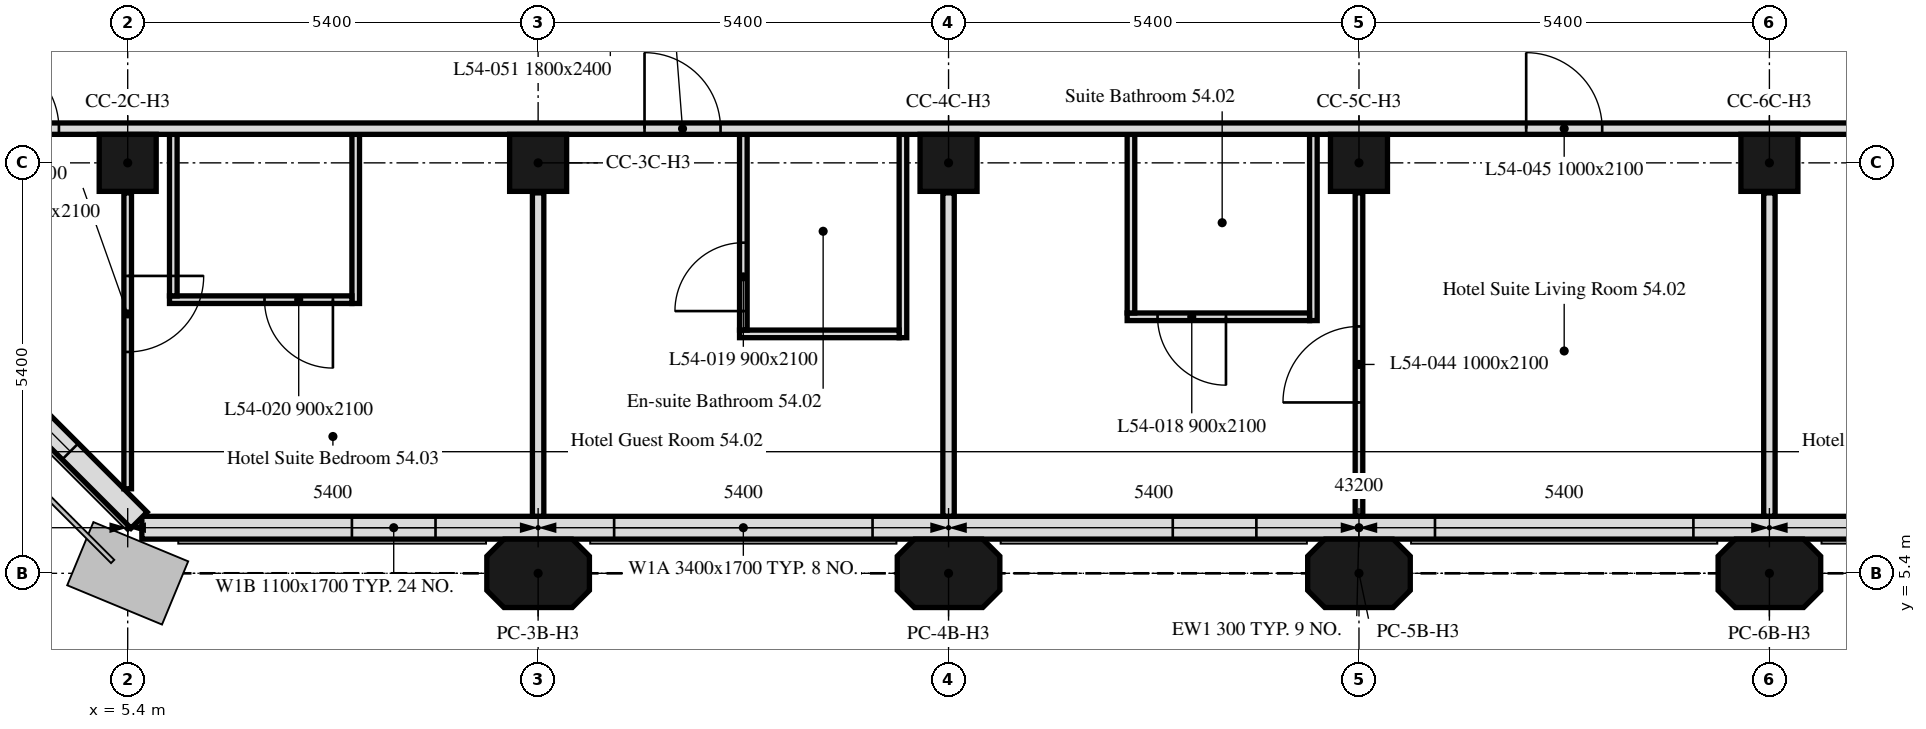
"""IFC4 building model, lengths in metres.
Left out: names, types, materials, properties, quantities, classifications, styles, units other than length and angle.
Written with IfcOpenShell. Run it as: python <this file> out.ifc"""

import sys

from ifc_helpers import new_model, si_unit, direction, frame, frame_2d, origin, origin_2d, place, context, subcontext, project, spatial, polyline, rectangle, outline, extrude, element, fill, save


model = new_model("IFC4")
c1 = context("Model", 3, precision=1e-05, world=origin(), true_north=direction((0.0, 1.0)))
c2 = subcontext(c1, "Body", "Model", "MODEL_VIEW")
j1 = project(units=[si_unit("LENGTHUNIT", "METRE"), si_unit("PLANEANGLEUNIT", "RADIAN")], contexts=[c1])
p1 = place(None, origin())
s1 = spatial("IfcSite", under=j1, at=p1, CompositionType="ELEMENT")
p2 = place(p1, origin())
s2 = spatial("IfcBuilding", under=s1, at=p2, CompositionType="ELEMENT")
p3 = place(p2, frame((0.0, 0.0, 217.0)))
s3 = spatial("IfcBuildingStorey", under=s2, at=p3, CompositionType="ELEMENT", Elevation=217.0)
for number, where, z_axis, x_axis in (
    (1, (10.8, 5.4, 0.0), (0.0, 0.0, 1.0), (1.0, 0.0, 0.0)),
    (2, (16.2, 5.4, 0.0), (0.0, 0.0, 1.0), (1.0, 0.0, 0.0)),
    (3, (21.6, 5.4, 0.0), (0.0, 0.0, 1.0), (1.0, 0.0, 0.0)),
    (4, (27.0, 5.4, 0.0), (0.0, 0.0, 1.0), (1.0, 0.0, 0.0)),
):
    element("IfcColumn", number, at=place(p3, frame(where, z_axis=z_axis, x_axis=x_axis)), inside=s3, PredefinedType="COLUMN", context=c2, shape_type="SweptSolid", body=[
        extrude(outline(polyline([(-0.45, -0.45), (0.45, -0.45), (0.675, -0.225), (0.675, 0.225), (0.45, 0.45), (-0.45, 0.45), (-0.675, 0.225), (-0.675, -0.225), (-0.45, -0.45)])), origin(), (0.0, 0.0, 1.0), 3.0),
    ])
for number, where, z_axis, x_axis in (
    (5, (5.4, 10.8, 0.0), (0.0, 0.0, 1.0), (1.0, 0.0, 0.0)),
    (6, (10.8, 10.8, 0.0), (0.0, 0.0, 1.0), (1.0, 0.0, 0.0)),
    (7, (16.2, 10.8, 0.0), (0.0, 0.0, 1.0), (1.0, 0.0, 0.0)),
    (8, (21.6, 10.8, 0.0), (0.0, 0.0, 1.0), (1.0, 0.0, 0.0)),
    (9, (27.0, 10.8, 0.0), (0.0, 0.0, 1.0), (1.0, 0.0, 0.0)),
):
    element("IfcColumn", number, at=place(p3, frame(where, z_axis=z_axis, x_axis=x_axis)), inside=s3, PredefinedType="COLUMN", context=c2, shape_type="SweptSolid", body=[
        extrude(rectangle(XDim=0.75, YDim=0.75, at=origin_2d()), origin(), (0.0, 0.0, 1.0), 3.0),
    ])
p4 = place(p3, frame((5.586, 6.0, 0.0), z_axis=(0.0, 0.0, 1.0), x_axis=(1.0, 0.0, 0.0)))
e10 = element("IfcWall", 10, at=p4, inside=s3, PredefinedType="SOLIDWALL", context=c2, shape_type="SweptSolid", body=[
    extrude(rectangle(XDim=32.027, YDim=0.3, at=frame_2d((16.014, 0.0))), origin(), (0.0, 0.0, 1.0), 3.0),
])
p5 = place(p4, frame((2.764, 0.0, 0.9)))
e11 = element("IfcOpeningElement", 11, at=p5, cuts=e10, PredefinedType="OPENING", context=c2, shape_type="SweptSolid", body=[
    extrude(rectangle(XDim=1.1, YDim=1.7, at=frame_2d((0.55, 0.85))), frame((0.0, 0.16, 0.0), z_axis=(0.0, -1.0, 0.0), x_axis=(1.0, 0.0, 0.0)), (0.0, 0.0, 1.0), 0.32),
])
p6 = place(p4, frame((6.214, 0.0, 0.9)))
e12 = element("IfcOpeningElement", 12, at=p6, cuts=e10, PredefinedType="OPENING", context=c2, shape_type="SweptSolid", body=[
    extrude(rectangle(XDim=3.4, YDim=1.7, at=frame_2d((1.7, 0.85))), frame((0.0, 0.16, 0.0), z_axis=(0.0, -1.0, 0.0), x_axis=(1.0, 0.0, 0.0)), (0.0, 0.0, 1.0), 0.32),
])
p7 = place(p4, frame((13.564, 0.0, 0.9)))
e13 = element("IfcOpeningElement", 13, at=p7, cuts=e10, PredefinedType="OPENING", context=c2, shape_type="SweptSolid", body=[
    extrude(rectangle(XDim=1.1, YDim=1.7, at=frame_2d((0.55, 0.85))), frame((0.0, 0.16, 0.0), z_axis=(0.0, -1.0, 0.0), x_axis=(1.0, 0.0, 0.0)), (0.0, 0.0, 1.0), 0.32),
])
p8 = place(p4, frame((17.014, 0.0, 0.9)))
e14 = element("IfcOpeningElement", 14, at=p8, cuts=e10, PredefinedType="OPENING", context=c2, shape_type="SweptSolid", body=[
    extrude(rectangle(XDim=3.4, YDim=1.7, at=frame_2d((1.7, 0.85))), frame((0.0, 0.16, 0.0), z_axis=(0.0, -1.0, 0.0), x_axis=(1.0, 0.0, 0.0)), (0.0, 0.0, 1.0), 0.32),
])
p9 = place(p4, frame((24.364, 0.0, 0.9)))
e15 = element("IfcOpeningElement", 15, at=p9, cuts=e10, PredefinedType="OPENING", context=c2, shape_type="SweptSolid", body=[
    extrude(rectangle(XDim=1.1, YDim=1.7, at=frame_2d((0.55, 0.85))), frame((0.0, 0.16, 0.0), z_axis=(0.0, -1.0, 0.0), x_axis=(1.0, 0.0, 0.0)), (0.0, 0.0, 1.0), 0.32),
])
p10 = place(p4, frame((27.814, 0.0, 0.9)))
e16 = element("IfcOpeningElement", 16, at=p10, cuts=e10, PredefinedType="OPENING", context=c2, shape_type="SweptSolid", body=[
    extrude(rectangle(XDim=3.4, YDim=1.7, at=frame_2d((1.7, 0.85))), frame((0.0, 0.16, 0.0), z_axis=(0.0, -1.0, 0.0), x_axis=(1.0, 0.0, 0.0)), (0.0, 0.0, 1.0), 0.32),
])
p11 = place(p3, frame((0.699, 10.949, 0.0), z_axis=(0.0, 0.0, 1.0), x_axis=(0.707106781187, -0.707106781187, 0.0)))
e17 = element("IfcWall", 17, at=p11, inside=s3, PredefinedType="SOLIDWALL", context=c2, shape_type="SweptSolid", body=[
    extrude(rectangle(XDim=6.86, YDim=0.3, at=frame_2d((3.43, 0.0))), origin(), (0.0, 0.0, 1.0), 3.0),
])
p12 = place(p11, frame((1.28, 0.0, 0.9)))
e18 = element("IfcOpeningElement", 18, at=p12, cuts=e17, PredefinedType="OPENING", context=c2, shape_type="SweptSolid", body=[
    extrude(rectangle(XDim=1.1, YDim=1.7, at=frame_2d((0.55, 0.85))), frame((0.0, 0.16, 0.0), z_axis=(0.0, -1.0, 0.0), x_axis=(1.0, 0.0, 0.0)), (0.0, 0.0, 1.0), 0.32),
])
p13 = place(p11, frame((4.48, 0.0, 0.9)))
e19 = element("IfcOpeningElement", 19, at=p13, cuts=e17, PredefinedType="OPENING", context=c2, shape_type="SweptSolid", body=[
    extrude(rectangle(XDim=1.1, YDim=1.7, at=frame_2d((0.55, 0.85))), frame((0.0, 0.16, 0.0), z_axis=(0.0, -1.0, 0.0), x_axis=(1.0, 0.0, 0.0)), (0.0, 0.0, 1.0), 0.32),
])
p14 = place(p3, frame((27.0, 10.405, 0.0), z_axis=(0.0, 0.0, 1.0), x_axis=(0.0, -1.0, 0.0)))
e20 = element("IfcWall", 20, at=p14, inside=s3, PredefinedType="PARTITIONING", context=c2, shape_type="SweptSolid", body=[
    extrude(rectangle(XDim=4.254, YDim=0.15, at=frame_2d((2.127, 0.0))), origin(), (0.0, 0.0, 1.0), 3.0),
])
p15 = place(p3, frame((21.6, 6.151, 0.0), z_axis=(0.0, 0.0, 1.0), x_axis=(0.0, 1.0, 0.0)))
e21 = element("IfcWall", 21, at=p15, inside=s3, PredefinedType="PARTITIONING", context=c2, shape_type="SweptSolid", body=[
    extrude(rectangle(XDim=4.254, YDim=0.1, at=frame_2d((2.127, 0.0))), origin(), (0.0, 0.0, 1.0), 3.0),
])
p16 = place(p15, frame((1.497, 0.0, 0.0)))
e22 = element("IfcOpeningElement", 22, at=p16, cuts=e21, PredefinedType="OPENING", context=c2, shape_type="SweptSolid", body=[
    extrude(rectangle(XDim=1.0, YDim=2.1, at=frame_2d((0.5, 1.05))), frame((0.0, 0.05, 0.0), z_axis=(0.0, -1.0, 0.0), x_axis=(1.0, 0.0, 0.0)), (0.0, 0.0, 1.0), 0.1),
])
p17 = place(p3, frame((21.0, 11.175, 0.0), z_axis=(0.0, 0.0, 1.0), x_axis=(0.0, -1.0, 0.0)))
e23 = element("IfcWall", 23, at=p17, inside=s3, PredefinedType="PARTITIONING", context=c2, shape_type="SweptSolid", body=[
    extrude(rectangle(XDim=2.45, YDim=0.1, at=frame_2d((1.225, 0.0))), origin(), (0.0, 0.0, 1.0), 3.0),
])
p18 = place(p3, frame((20.95, 8.775, 0.0), z_axis=(0.0, 0.0, 1.0), x_axis=(-1.0, 0.0, 0.0)))
e24 = element("IfcWall", 24, at=p18, inside=s3, PredefinedType="PARTITIONING", context=c2, shape_type="SweptSolid", body=[
    extrude(rectangle(XDim=2.4, YDim=0.1, at=frame_2d((1.2, 0.0))), origin(), (0.0, 0.0, 1.0), 3.0),
])
p19 = place(p18, frame((1.1, 0.0, 0.0)))
e25 = element("IfcOpeningElement", 25, at=p19, cuts=e24, PredefinedType="OPENING", context=c2, shape_type="SweptSolid", body=[
    extrude(rectangle(XDim=0.9, YDim=2.1, at=frame_2d((0.45, 1.05))), frame((0.0, 0.05, 0.0), z_axis=(0.0, -1.0, 0.0), x_axis=(1.0, 0.0, 0.0)), (0.0, 0.0, 1.0), 0.1),
])
p20 = place(p3, frame((18.6, 8.825, 0.0), z_axis=(0.0, 0.0, 1.0), x_axis=(0.0, 1.0, 0.0)))
e26 = element("IfcWall", 26, at=p20, inside=s3, PredefinedType="PARTITIONING", context=c2, shape_type="SweptSolid", body=[
    extrude(rectangle(XDim=2.35, YDim=0.1, at=frame_2d((1.175, 0.0))), origin(), (0.0, 0.0, 1.0), 3.0),
])
p21 = place(p3, frame((16.2, 10.405, 0.0), z_axis=(0.0, 0.0, 1.0), x_axis=(0.0, -1.0, 0.0)))
e27 = element("IfcWall", 27, at=p21, inside=s3, PredefinedType="PARTITIONING", context=c2, shape_type="SweptSolid", body=[
    extrude(rectangle(XDim=4.254, YDim=0.15, at=frame_2d((2.127, 0.0))), origin(), (0.0, 0.0, 1.0), 3.0),
])
p22 = place(p3, frame((15.6, 11.175, 0.0), z_axis=(0.0, 0.0, 1.0), x_axis=(0.0, -1.0, 0.0)))
e28 = element("IfcWall", 28, at=p22, inside=s3, PredefinedType="PARTITIONING", context=c2, shape_type="SweptSolid", body=[
    extrude(rectangle(XDim=2.675, YDim=0.1, at=frame_2d((1.337, 0.0))), origin(), (0.0, 0.0, 1.0), 3.0),
])
p23 = place(p3, frame((15.55, 8.55, 0.0), z_axis=(0.0, 0.0, 1.0), x_axis=(-1.0, 0.0, 0.0)))
e29 = element("IfcWall", 29, at=p23, inside=s3, PredefinedType="PARTITIONING", context=c2, shape_type="SweptSolid", body=[
    extrude(rectangle(XDim=2.1, YDim=0.1, at=frame_2d((1.05, 0.0))), origin(), (0.0, 0.0, 1.0), 3.0),
])
p24 = place(p3, frame((13.5, 8.6, 0.0), z_axis=(0.0, 0.0, 1.0), x_axis=(0.0, 1.0, 0.0)))
e30 = element("IfcWall", 30, at=p24, inside=s3, PredefinedType="PARTITIONING", context=c2, shape_type="SweptSolid", body=[
    extrude(rectangle(XDim=2.575, YDim=0.1, at=frame_2d((1.288, 0.0))), origin(), (0.0, 0.0, 1.0), 3.0),
])
p25 = place(p24, frame((0.25, 0.0, 0.0)))
e31 = element("IfcOpeningElement", 31, at=p25, cuts=e30, PredefinedType="OPENING", context=c2, shape_type="SweptSolid", body=[
    extrude(rectangle(XDim=0.9, YDim=2.1, at=frame_2d((0.45, 1.05))), frame((0.0, 0.05, 0.0), z_axis=(0.0, -1.0, 0.0), x_axis=(1.0, 0.0, 0.0)), (0.0, 0.0, 1.0), 0.1),
])
p26 = place(p3, frame((10.8, 10.405, 0.0), z_axis=(0.0, 0.0, 1.0), x_axis=(0.0, -1.0, 0.0)))
e32 = element("IfcWall", 32, at=p26, inside=s3, PredefinedType="PARTITIONING", context=c2, shape_type="SweptSolid", body=[
    extrude(rectangle(XDim=4.254, YDim=0.15, at=frame_2d((2.127, 0.0))), origin(), (0.0, 0.0, 1.0), 3.0),
])
p27 = place(p3, frame((8.4, 11.175, 0.0), z_axis=(0.0, 0.0, 1.0), x_axis=(0.0, -1.0, 0.0)))
e33 = element("IfcWall", 33, at=p27, inside=s3, PredefinedType="PARTITIONING", context=c2, shape_type="SweptSolid", body=[
    extrude(rectangle(XDim=2.225, YDim=0.1, at=frame_2d((1.113, 0.0))), origin(), (0.0, 0.0, 1.0), 3.0),
])
p28 = place(p3, frame((8.35, 9.0, 0.0), z_axis=(0.0, 0.0, 1.0), x_axis=(-1.0, 0.0, 0.0)))
e34 = element("IfcWall", 34, at=p28, inside=s3, PredefinedType="PARTITIONING", context=c2, shape_type="SweptSolid", body=[
    extrude(rectangle(XDim=2.4, YDim=0.1, at=frame_2d((1.2, 0.0))), origin(), (0.0, 0.0, 1.0), 3.0),
])
p29 = place(p28, frame((0.25, 0.0, 0.0)))
e35 = element("IfcOpeningElement", 35, at=p29, cuts=e34, PredefinedType="OPENING", context=c2, shape_type="SweptSolid", body=[
    extrude(rectangle(XDim=0.9, YDim=2.1, at=frame_2d((0.45, 1.05))), frame((0.0, 0.05, 0.0), z_axis=(0.0, -1.0, 0.0), x_axis=(1.0, 0.0, 0.0)), (0.0, 0.0, 1.0), 0.1),
])
p30 = place(p3, frame((6.0, 9.05, 0.0), z_axis=(0.0, 0.0, 1.0), x_axis=(0.0, 1.0, 0.0)))
e36 = element("IfcWall", 36, at=p30, inside=s3, PredefinedType="PARTITIONING", context=c2, shape_type="SweptSolid", body=[
    extrude(rectangle(XDim=2.125, YDim=0.1, at=frame_2d((1.062, 0.0))), origin(), (0.0, 0.0, 1.0), 3.0),
])
p31 = place(p3, frame((5.4, 10.405, 0.0), z_axis=(0.0, 0.0, 1.0), x_axis=(0.0, -1.0, 0.0)))
e37 = element("IfcWall", 37, at=p31, inside=s3, PredefinedType="PARTITIONING", context=c2, shape_type="SweptSolid", body=[
    extrude(rectangle(XDim=3.893, YDim=0.1, at=frame_2d((1.946, 0.0))), origin(), (0.0, 0.0, 1.0), 3.0),
])
p32 = place(p31, frame((1.093, 0.0, 0.0)))
e38 = element("IfcOpeningElement", 38, at=p32, cuts=e37, PredefinedType="OPENING", context=c2, shape_type="SweptSolid", body=[
    extrude(rectangle(XDim=1.0, YDim=2.1, at=frame_2d((0.5, 1.05))), frame((0.0, 0.05, 0.0), z_axis=(0.0, -1.0, 0.0), x_axis=(1.0, 0.0, 0.0)), (0.0, 0.0, 1.0), 0.1),
])
p33 = place(p3, frame((0.751, 11.25, 0.0), z_axis=(0.0, 0.0, 1.0), x_axis=(1.0, 0.0, 0.0)))
e39 = element("IfcWall", 39, at=p33, inside=s3, PredefinedType="PARTITIONING", context=c2, shape_type="SweptSolid", body=[
    extrude(rectangle(XDim=41.698, YDim=0.15, at=frame_2d((20.849, 0.0))), origin(), (0.0, 0.0, 1.0), 3.0),
])
p34 = place(p33, frame((39.249, 0.0, 0.0)))
e40 = element("IfcOpeningElement", 40, at=p34, cuts=e39, PredefinedType="OPENING", context=c2, shape_type="SweptSolid", body=[
    extrude(rectangle(XDim=1.0, YDim=2.1, at=frame_2d((0.5, 1.05))), frame((0.0, 0.075, 0.0), z_axis=(0.0, -1.0, 0.0), x_axis=(1.0, 0.0, 0.0)), (0.0, 0.0, 1.0), 0.15),
])
p35 = place(p33, frame((27.649, 0.0, 0.0)))
e41 = element("IfcOpeningElement", 41, at=p35, cuts=e39, PredefinedType="OPENING", context=c2, shape_type="SweptSolid", body=[
    extrude(rectangle(XDim=1.0, YDim=2.1, at=frame_2d((0.5, 1.05))), frame((0.0, 0.075, 0.0), z_axis=(0.0, -1.0, 0.0), x_axis=(1.0, 0.0, 0.0)), (0.0, 0.0, 1.0), 0.15),
])
p36 = place(p33, frame((23.049, 0.0, 0.0)))
e42 = element("IfcOpeningElement", 42, at=p36, cuts=e39, PredefinedType="OPENING", context=c2, shape_type="SweptSolid", body=[
    extrude(rectangle(XDim=1.0, YDim=2.1, at=frame_2d((0.5, 1.05))), frame((0.0, 0.075, 0.0), z_axis=(0.0, -1.0, 0.0), x_axis=(1.0, 0.0, 0.0)), (0.0, 0.0, 1.0), 0.15),
])
p37 = place(p33, frame((11.449, 0.0, 0.0)))
e43 = element("IfcOpeningElement", 43, at=p37, cuts=e39, PredefinedType="OPENING", context=c2, shape_type="SweptSolid", body=[
    extrude(rectangle(XDim=1.0, YDim=2.1, at=frame_2d((0.5, 1.05))), frame((0.0, 0.075, 0.0), z_axis=(0.0, -1.0, 0.0), x_axis=(1.0, 0.0, 0.0)), (0.0, 0.0, 1.0), 0.15),
])
p38 = place(p33, frame((2.744, 0.0, 0.0)))
e44 = element("IfcOpeningElement", 44, at=p38, cuts=e39, PredefinedType="OPENING", context=c2, shape_type="SweptSolid", body=[
    extrude(rectangle(XDim=1.0, YDim=2.1, at=frame_2d((0.5, 1.05))), frame((0.0, 0.075, 0.0), z_axis=(0.0, -1.0, 0.0), x_axis=(1.0, 0.0, 0.0)), (0.0, 0.0, 1.0), 0.15),
])
p39 = place(p5, origin())
e45 = element("IfcWindow", 45, at=p39, inside=s3, PartitioningType="SINGLE_PANEL", PredefinedType="WINDOW", context=c2, shape_type="SweptSolid", body=[
    extrude(rectangle(XDim=1.1, YDim=1.7, at=frame_2d((0.55, 0.85))), frame((0.0, 0.03, 0.0), z_axis=(0.0, -1.0, 0.0), x_axis=(1.0, 0.0, 0.0)), (0.0, 0.0, 1.0), 0.06),
])
fill(e11, e45)
p40 = place(p6, origin())
e46 = element("IfcWindow", 46, at=p40, inside=s3, PartitioningType="SINGLE_PANEL", PredefinedType="WINDOW", context=c2, shape_type="SweptSolid", body=[
    extrude(rectangle(XDim=3.4, YDim=1.7, at=frame_2d((1.7, 0.85))), frame((0.0, 0.03, 0.0), z_axis=(0.0, -1.0, 0.0), x_axis=(1.0, 0.0, 0.0)), (0.0, 0.0, 1.0), 0.06),
])
fill(e12, e46)
p41 = place(p7, origin())
e47 = element("IfcWindow", 47, at=p41, inside=s3, PartitioningType="SINGLE_PANEL", PredefinedType="WINDOW", context=c2, shape_type="SweptSolid", body=[
    extrude(rectangle(XDim=1.1, YDim=1.7, at=frame_2d((0.55, 0.85))), frame((0.0, 0.03, 0.0), z_axis=(0.0, -1.0, 0.0), x_axis=(1.0, 0.0, 0.0)), (0.0, 0.0, 1.0), 0.06),
])
fill(e13, e47)
p42 = place(p8, origin())
e48 = element("IfcWindow", 48, at=p42, inside=s3, PartitioningType="SINGLE_PANEL", PredefinedType="WINDOW", context=c2, shape_type="SweptSolid", body=[
    extrude(rectangle(XDim=3.4, YDim=1.7, at=frame_2d((1.7, 0.85))), frame((0.0, 0.03, 0.0), z_axis=(0.0, -1.0, 0.0), x_axis=(1.0, 0.0, 0.0)), (0.0, 0.0, 1.0), 0.06),
])
fill(e14, e48)
p43 = place(p13, origin())
e49 = element("IfcWindow", 49, at=p43, inside=s3, PartitioningType="SINGLE_PANEL", PredefinedType="WINDOW", context=c2, shape_type="SweptSolid", body=[
    extrude(rectangle(XDim=1.1, YDim=1.7, at=frame_2d((0.55, 0.85))), frame((0.0, 0.03, 0.0), z_axis=(0.0, -1.0, 0.0), x_axis=(1.0, 0.0, 0.0)), (0.0, 0.0, 1.0), 0.06),
])
fill(e19, e49)
p44 = place(p19, origin())
e50 = element("IfcDoor", 50, at=p44, inside=s3, OperationType="SINGLE_SWING_LEFT", PredefinedType="DOOR", context=c2, shape_type="SweptSolid", body=[
    extrude(rectangle(XDim=0.9, YDim=2.1, at=frame_2d((0.45, 1.05))), frame((0.0, 0.025, 0.0), z_axis=(0.0, -1.0, 0.0), x_axis=(1.0, 0.0, 0.0)), (0.0, 0.0, 1.0), 0.05),
])
fill(e25, e50)
p45 = place(p25, origin())
e51 = element("IfcDoor", 51, at=p45, inside=s3, OperationType="SINGLE_SWING_LEFT", PredefinedType="DOOR", context=c2, shape_type="SweptSolid", body=[
    extrude(rectangle(XDim=0.9, YDim=2.1, at=frame_2d((0.45, 1.05))), frame((0.0, 0.025, 0.0), z_axis=(0.0, -1.0, 0.0), x_axis=(1.0, 0.0, 0.0)), (0.0, 0.0, 1.0), 0.05),
])
fill(e31, e51)
p46 = place(p29, origin())
e52 = element("IfcDoor", 52, at=p46, inside=s3, OperationType="SINGLE_SWING_RIGHT", PredefinedType="DOOR", context=c2, shape_type="SweptSolid", body=[
    extrude(rectangle(XDim=0.9, YDim=2.1, at=frame_2d((0.45, 1.05))), frame((0.0, 0.025, 0.0), z_axis=(0.0, -1.0, 0.0), x_axis=(1.0, 0.0, 0.0)), (0.0, 0.0, 1.0), 0.05),
])
fill(e35, e52)
p47 = place(p16, origin())
e53 = element("IfcDoor", 53, at=p47, inside=s3, OperationType="SINGLE_SWING_LEFT", PredefinedType="DOOR", context=c2, shape_type="SweptSolid", body=[
    extrude(rectangle(XDim=1.0, YDim=2.1, at=frame_2d((0.5, 1.05))), frame((0.0, 0.025, 0.0), z_axis=(0.0, -1.0, 0.0), x_axis=(1.0, 0.0, 0.0)), (0.0, 0.0, 1.0), 0.05),
])
fill(e22, e53)
p48 = place(p36, origin())
e54 = element("IfcDoor", 54, at=p48, inside=s3, OperationType="SINGLE_SWING_RIGHT", PredefinedType="DOOR", context=c2, shape_type="SweptSolid", body=[
    extrude(rectangle(XDim=1.0, YDim=2.1, at=frame_2d((0.5, 1.05))), frame((0.0, 0.025, 0.0), z_axis=(0.0, -1.0, 0.0), x_axis=(1.0, 0.0, 0.0)), (0.0, 0.0, 1.0), 0.05),
])
fill(e42, e54)
p49 = place(p37, origin())
e55 = element("IfcDoor", 55, at=p49, inside=s3, OperationType="SINGLE_SWING_RIGHT", PredefinedType="DOOR", context=c2, shape_type="SweptSolid", body=[
    extrude(rectangle(XDim=1.0, YDim=2.1, at=frame_2d((0.5, 1.05))), frame((0.0, 0.025, 0.0), z_axis=(0.0, -1.0, 0.0), x_axis=(1.0, 0.0, 0.0)), (0.0, 0.0, 1.0), 0.05),
])
fill(e43, e55)
p50 = place(p32, origin())
e56 = element("IfcDoor", 56, at=p50, inside=s3, OperationType="SINGLE_SWING_RIGHT", PredefinedType="DOOR", context=c2, shape_type="SweptSolid", body=[
    extrude(rectangle(XDim=1.0, YDim=2.1, at=frame_2d((0.5, 1.05))), frame((0.0, 0.025, 0.0), z_axis=(0.0, -1.0, 0.0), x_axis=(1.0, 0.0, 0.0)), (0.0, 0.0, 1.0), 0.05),
])
fill(e38, e56)
p51 = place(p38, origin())
e57 = element("IfcDoor", 57, at=p51, inside=s3, OperationType="SINGLE_SWING_LEFT", PredefinedType="DOOR", context=c2, shape_type="SweptSolid", body=[
    extrude(rectangle(XDim=1.0, YDim=2.1, at=frame_2d((0.5, 1.05))), frame((0.0, 0.025, 0.0), z_axis=(0.0, -1.0, 0.0), x_axis=(1.0, 0.0, 0.0)), (0.0, 0.0, 1.0), 0.05),
])
fill(e44, e57)
save(model, sys.argv[1])
